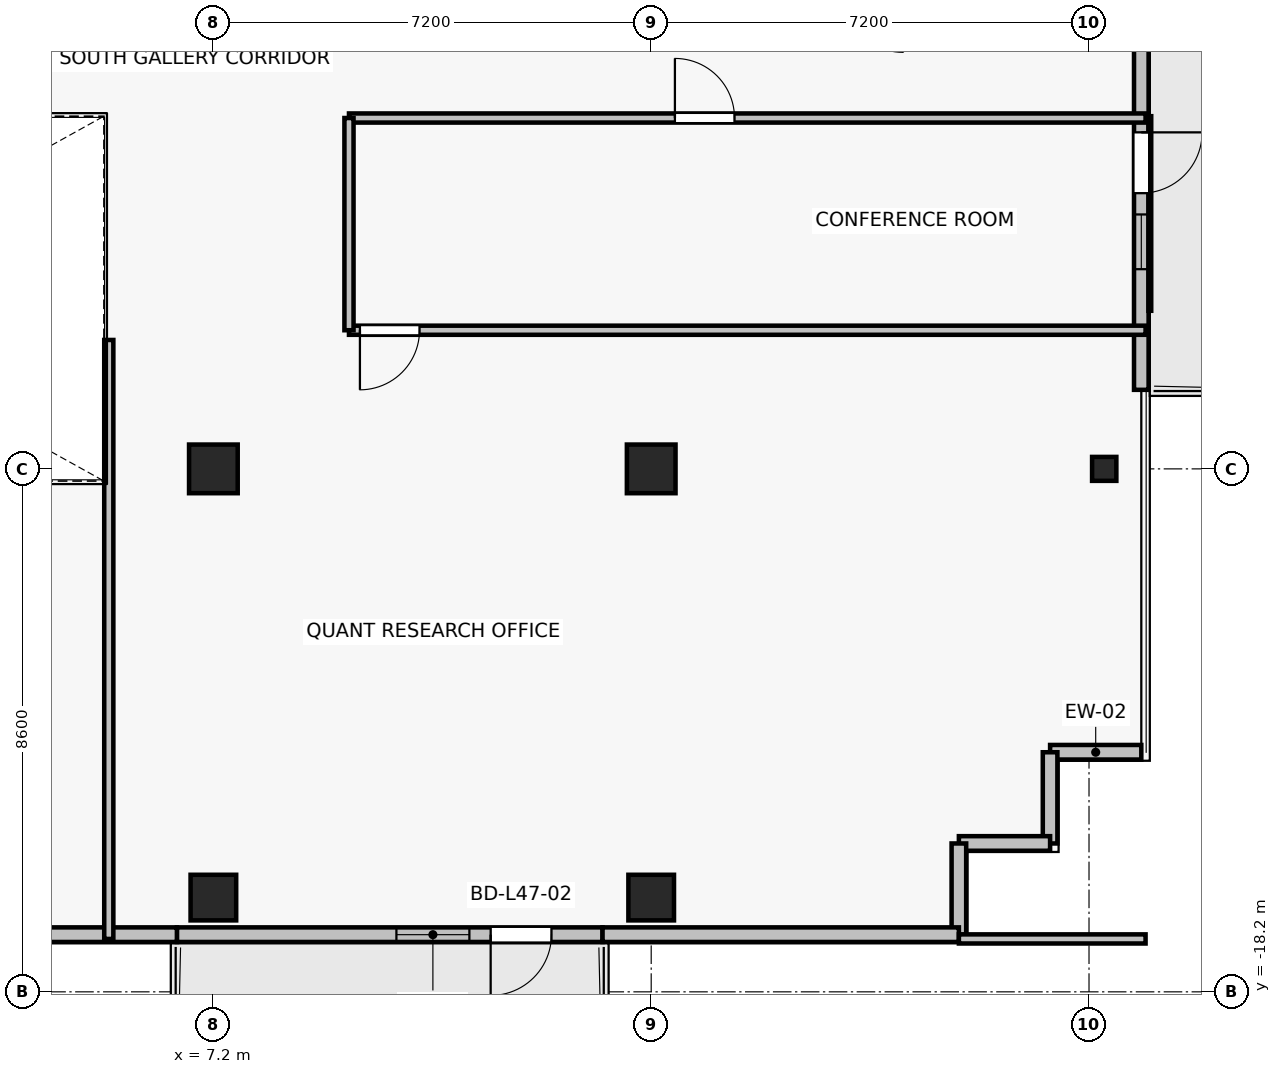
"""IFC4 building model, lengths in metres.
Left out: names, types, materials, properties, quantities, classifications, styles, units other than length and angle.
Written with IfcOpenShell. Run it as: python <this file> out.ifc"""

import sys

from ifc_helpers import new_model, si_unit, direction, frame, frame_2d, origin, origin_2d, place, context, subcontext, project, spatial, rectangle, i_section, extrude, source, transform, mapped, element, fill, save


model = new_model("IFC4")
c1 = context("Model", 3, precision=1e-05, world=origin(), true_north=direction((0.0, 1.0)))
c2 = subcontext(c1, "Body", "Model", "MODEL_VIEW")
j1 = project(units=[si_unit("LENGTHUNIT", "METRE"), si_unit("PLANEANGLEUNIT", "RADIAN")], contexts=[c1])
p1 = place(None, origin())
s1 = spatial("IfcSite", under=j1, at=p1, CompositionType="ELEMENT")
p2 = place(p1, origin())
s2 = spatial("IfcBuilding", under=s1, at=p2, CompositionType="ELEMENT")
p3 = place(p2, frame((0.0, 0.0, 169.3)))
s3 = spatial("IfcBuildingStorey", under=s2, at=p3, CompositionType="ELEMENT", Elevation=169.3)
for number, where, z_axis, x_axis in (
    (1, (7.2, -9.6, 0.0), (0.0, 0.0, 1.0), (1.0, 0.0, 0.0)),
    (2, (14.4, -9.6, 0.0), (0.0, 0.0, 1.0), (1.0, 0.0, 0.0)),
):
    element("IfcColumn", number, at=place(p3, frame(where, z_axis=z_axis, x_axis=x_axis)), inside=s3, PredefinedType="COLUMN", context=c2, shape_type="SweptSolid", body=[
        extrude(rectangle(XDim=0.8, YDim=0.8, at=origin_2d()), origin(), (0.0, 0.0, 1.0), 3.3),
    ])
for number, where, z_axis, x_axis in (
    (3, (7.2, -16.65, 0.0), (0.0, 0.0, 1.0), (1.0, 0.0, 0.0)),
    (4, (14.4, -16.65, 0.0), (0.0, 0.0, 1.0), (1.0, 0.0, 0.0)),
):
    element("IfcColumn", number, at=place(p3, frame(where, z_axis=z_axis, x_axis=x_axis)), inside=s3, PredefinedType="COLUMN", context=c2, shape_type="SweptSolid", body=[
        extrude(rectangle(XDim=0.75, YDim=0.75, at=origin_2d()), origin(), (0.0, 0.0, 1.0), 3.3),
    ])
p4 = place(p3, frame((21.85, -9.6, 0.0), z_axis=(0.0, 0.0, 1.0), x_axis=(1.0, 0.0, 0.0)))
e5 = element("IfcColumn", 5, at=p4, inside=s3, PredefinedType="COLUMN", context=c2, shape_type="SweptSolid", body=[
    extrude(i_section(OverallWidth=0.399, OverallDepth=0.394, WebThickness=0.023, FlangeThickness=0.037, FilletRadius=0.015, at=origin_2d()), origin(), (0.0, 0.0, 1.0), 3.3),
])
p5 = place(p3, frame((13.6, -17.26, 0.0), z_axis=(0.0, 0.0, 1.0), x_axis=(-1.0, 0.0, 0.0)))
e6 = element("IfcWall", 6, at=p5, inside=s3, PredefinedType="SOLIDWALL", context=c2, shape_type="SweptSolid", body=[
    extrude(rectangle(XDim=7.0, YDim=0.24, at=frame_2d((3.5, 0.0))), origin(), (0.0, 0.0, 1.0), 2.59),
])
p6 = place(p5, frame((0.84, 0.0, 0.0)))
e7 = element("IfcOpeningElement", 7, at=p6, cuts=e6, PredefinedType="OPENING", context=c2, shape_type="SweptSolid", body=[
    extrude(rectangle(XDim=1.0, YDim=2.2, at=frame_2d((0.5, 1.1))), frame((0.0, 0.13, 0.0), z_axis=(0.0, -1.0, 0.0), x_axis=(1.0, 0.0, 0.0)), (0.0, 0.0, 1.0), 0.26),
])
p7 = place(p5, frame((2.19, 0.0, 0.85)))
e8 = element("IfcOpeningElement", 8, at=p7, cuts=e6, PredefinedType="OPENING", context=c2, shape_type="SweptSolid", body=[
    extrude(rectangle(XDim=1.2, YDim=1.5, at=frame_2d((0.6, 0.75))), frame((0.0, 0.13, 0.0), z_axis=(0.0, -1.0, 0.0), x_axis=(1.0, 0.0, 0.0)), (0.0, 0.0, 1.0), 0.26),
])
p8 = place(p3, frame((22.46, -2.5, 0.0), z_axis=(0.0, 0.0, 1.0), x_axis=(0.0, -1.0, 0.0)))
e9 = element("IfcWall", 9, at=p8, inside=s3, PredefinedType="SOLIDWALL", context=c2, shape_type="SweptSolid", body=[
    extrude(rectangle(XDim=5.8, YDim=0.24, at=frame_2d((2.9, 0.0))), origin(), (0.0, 0.0, 1.0), 3.075),
])
p9 = place(p8, frame((1.566, 0.0, 0.0)))
e10 = element("IfcOpeningElement", 10, at=p9, cuts=e9, PredefinedType="OPENING", context=c2, shape_type="SweptSolid", body=[
    extrude(rectangle(XDim=1.0, YDim=2.2, at=frame_2d((0.5, 1.1))), frame((0.0, 0.13, 0.0), z_axis=(0.0, -1.0, 0.0), x_axis=(1.0, 0.0, 0.0)), (0.0, 0.0, 1.0), 0.26),
])
p10 = place(p8, frame((2.916, 0.0, 0.85)))
e11 = element("IfcOpeningElement", 11, at=p10, cuts=e9, PredefinedType="OPENING", context=c2, shape_type="SweptSolid", body=[
    extrude(rectangle(XDim=0.9, YDim=1.35, at=frame_2d((0.45, 0.675))), frame((0.0, 0.13, 0.0), z_axis=(0.0, -1.0, 0.0), x_axis=(1.0, 0.0, 0.0)), (0.0, 0.0, 1.0), 0.26),
])
for number, where, z_axis, x_axis in (
    (12, (20.96, -14.26, 0.0), (0.0, 0.0, 1.0), (1.0, 0.0, 0.0)),
    (13, (20.96, -15.76, 0.0), (0.0, 0.0, 1.0), (0.0, 1.0, 0.0)),
    (14, (19.46, -15.76, 0.0), (0.0, 0.0, 1.0), (1.0, 0.0, 0.0)),
    (15, (19.46, -17.26, 0.0), (0.0, 0.0, 1.0), (0.0, 1.0, 0.0)),
):
    element("IfcWall", number, at=place(p3, frame(where, z_axis=z_axis, x_axis=x_axis)), inside=s3, PredefinedType="SOLIDWALL", context=c2, shape_type="SweptSolid", body=[
        extrude(rectangle(XDim=1.5, YDim=0.24, at=frame_2d((0.75, 0.0))), origin(), (0.0, 0.0, 1.0), 3.075),
    ])
p11 = place(p3, frame((13.6, -17.26, 0.0), z_axis=(0.0, 0.0, 1.0), x_axis=(1.0, 0.0, 0.0)))
e16 = element("IfcWall", 16, at=p11, inside=s3, PredefinedType="SOLIDWALL", context=c2, shape_type="SweptSolid", body=[
    extrude(rectangle(XDim=5.86, YDim=0.24, at=frame_2d((2.93, 0.0))), origin(), (0.0, 0.0, 1.0), 2.59),
])
p12 = place(p3, frame((3.2, -17.26, 0.0), z_axis=(0.0, 0.0, 1.0), x_axis=(1.0, 0.0, 0.0)))
e17 = element("IfcWall", 17, at=p12, inside=s3, PredefinedType="SOLIDWALL", context=c2, shape_type="SweptSolid", body=[
    extrude(rectangle(XDim=3.4, YDim=0.24, at=frame_2d((1.7, 0.0))), origin(), (0.0, 0.0, 1.0), 2.59),
])
p13 = place(p3, frame((22.53, -7.32, 0.0), z_axis=(0.0, 0.0, 1.0), x_axis=(-1.0, 0.0, 0.0)))
e18 = element("IfcWall", 18, at=p13, inside=s3, PredefinedType="PARTITIONING", context=c2, shape_type="SweptSolid", body=[
    extrude(rectangle(XDim=13.1, YDim=0.15, at=frame_2d((6.55, 0.0))), origin(), (0.0, 0.0, 1.0), 2.565),
])
p14 = place(p13, frame((11.94, 0.0, 0.0)))
e19 = element("IfcOpeningElement", 19, at=p14, cuts=e18, PredefinedType="OPENING", context=c2, shape_type="SweptSolid", body=[
    extrude(rectangle(XDim=0.98, YDim=2.15, at=frame_2d((0.49, 1.075))), frame((0.0, 0.085, 0.0), z_axis=(0.0, -1.0, 0.0), x_axis=(1.0, 0.0, 0.0)), (0.0, 0.0, 1.0), 0.17),
])
p15 = place(p3, frame((9.43, -3.83, 0.0), z_axis=(0.0, 0.0, 1.0), x_axis=(1.0, 0.0, 0.0)))
e20 = element("IfcWall", 20, at=p15, inside=s3, PredefinedType="PARTITIONING", context=c2, shape_type="SweptSolid", body=[
    extrude(rectangle(XDim=13.1, YDim=0.15, at=frame_2d((6.55, 0.0))), origin(), (0.0, 0.0, 1.0), 2.565),
])
p16 = place(p15, frame((5.36, 0.0, 0.0)))
e21 = element("IfcOpeningElement", 21, at=p16, cuts=e20, PredefinedType="OPENING", context=c2, shape_type="SweptSolid", body=[
    extrude(rectangle(XDim=0.98, YDim=2.15, at=frame_2d((0.49, 1.075))), frame((0.0, 0.085, 0.0), z_axis=(0.0, -1.0, 0.0), x_axis=(1.0, 0.0, 0.0)), (0.0, 0.0, 1.0), 0.17),
])
p17 = place(p3, frame((9.43, -7.32, 0.0), z_axis=(0.0, 0.0, 1.0), x_axis=(0.0, 1.0, 0.0)))
e22 = element("IfcWall", 22, at=p17, inside=s3, PredefinedType="PARTITIONING", context=c2, shape_type="SweptSolid", body=[
    extrude(rectangle(XDim=3.49, YDim=0.15, at=frame_2d((1.745, 0.0))), origin(), (0.0, 0.0, 1.0), 2.665),
])
p18 = place(p3, frame((22.53, -17.33, 0.0), z_axis=(0.0, 0.0, 1.0), x_axis=(-1.0, 0.0, 0.0)))
e23 = element("IfcWall", 23, at=p18, inside=s3, PredefinedType="PARTITIONING", context=c2, shape_type="SweptSolid", body=[
    extrude(rectangle(XDim=3.07, YDim=0.15, at=frame_2d((1.535, 0.0))), origin(), (0.0, 0.0, 1.0), 2.59),
])
p19 = place(p3, frame((5.48, -17.33, 0.0), z_axis=(0.0, 0.0, 1.0), x_axis=(0.0, 1.0, 0.0)))
e24 = element("IfcWall", 24, at=p19, inside=s3, PredefinedType="PARTITIONING", context=c2, shape_type="SweptSolid", body=[
    extrude(rectangle(XDim=9.85, YDim=0.15, at=frame_2d((4.925, 0.0))), origin(), (0.0, 0.0, 1.0), 2.565),
])
m1 = source(origin(), c2, "Body", "SweptSolid", [
    extrude(rectangle(XDim=1.0, YDim=2.2, at=frame_2d((0.5, 1.1))), frame((0.0, 0.025, 0.0), z_axis=(0.0, -1.0, 0.0), x_axis=(1.0, 0.0, 0.0)), (0.0, 0.0, 1.0), 0.05),
])
p20 = place(p6, origin())
e25 = element("IfcDoor", 25, at=p20, inside=s3, OperationType="SINGLE_SWING_RIGHT", PredefinedType="DOOR", context=c2, shape_type="MappedRepresentation", body=[
    mapped(m1, transform((0.0, 0.0, 0.0), x_axis=(1.0, 0.0, 0.0), y_axis=(0.0, 1.0, 0.0), z_axis=(0.0, 0.0, 1.0), scale=1.0)),
])
fill(e7, e25)
m2 = source(origin(), c2, "Body", "SweptSolid", [
    extrude(rectangle(XDim=1.2, YDim=1.5, at=frame_2d((0.6, 0.75))), frame((0.0, 0.03, 0.0), z_axis=(0.0, -1.0, 0.0), x_axis=(1.0, 0.0, 0.0)), (0.0, 0.0, 1.0), 0.06),
])
p21 = place(p7, origin())
e26 = element("IfcWindow", 26, at=p21, inside=s3, PartitioningType="SINGLE_PANEL", PredefinedType="WINDOW", context=c2, shape_type="MappedRepresentation", body=[
    mapped(m2, transform((0.0, 0.0, 0.0), x_axis=(1.0, 0.0, 0.0), y_axis=(0.0, 1.0, 0.0), z_axis=(0.0, 0.0, 1.0), scale=1.0)),
])
fill(e8, e26)
p22 = place(p9, origin())
e27 = element("IfcDoor", 27, at=p22, inside=s3, OperationType="SINGLE_SWING_LEFT", PredefinedType="DOOR", context=c2, shape_type="MappedRepresentation", body=[
    mapped(m1, transform((0.0, 0.0, 0.0), x_axis=(1.0, 0.0, 0.0), y_axis=(0.0, 1.0, 0.0), z_axis=(0.0, 0.0, 1.0), scale=1.0)),
])
fill(e10, e27)
m3 = source(origin(), c2, "Body", "SweptSolid", [
    extrude(rectangle(XDim=0.9, YDim=1.35, at=frame_2d((0.45, 0.675))), frame((0.0, 0.03, 0.0), z_axis=(0.0, -1.0, 0.0), x_axis=(1.0, 0.0, 0.0)), (0.0, 0.0, 1.0), 0.06),
])
p23 = place(p10, origin())
e28 = element("IfcWindow", 28, at=p23, inside=s3, PartitioningType="SINGLE_PANEL", PredefinedType="WINDOW", context=c2, shape_type="MappedRepresentation", body=[
    mapped(m3, transform((0.0, 0.0, 0.0), x_axis=(1.0, 0.0, 0.0), y_axis=(0.0, 1.0, 0.0), z_axis=(0.0, 0.0, 1.0), scale=1.0)),
])
fill(e11, e28)
m4 = source(origin(), c2, "Body", "SweptSolid", [
    extrude(rectangle(XDim=0.98, YDim=2.15, at=frame_2d((0.49, 1.075))), frame((0.0, 0.025, 0.0), z_axis=(0.0, -1.0, 0.0), x_axis=(1.0, 0.0, 0.0)), (0.0, 0.0, 1.0), 0.05),
])
p24 = place(p16, origin())
e29 = element("IfcDoor", 29, at=p24, inside=s3, OperationType="SINGLE_SWING_LEFT", PredefinedType="DOOR", context=c2, shape_type="MappedRepresentation", body=[
    mapped(m4, transform((0.0, 0.0, 0.0), x_axis=(1.0, 0.0, 0.0), y_axis=(0.0, 1.0, 0.0), z_axis=(0.0, 0.0, 1.0), scale=1.0)),
])
fill(e21, e29)
p25 = place(p14, origin())
e30 = element("IfcDoor", 30, at=p25, inside=s3, OperationType="SINGLE_SWING_RIGHT", PredefinedType="DOOR", context=c2, shape_type="MappedRepresentation", body=[
    mapped(m4, transform((0.0, 0.0, 0.0), x_axis=(1.0, 0.0, 0.0), y_axis=(0.0, 1.0, 0.0), z_axis=(0.0, 0.0, 1.0), scale=1.0)),
])
fill(e19, e30)
save(model, sys.argv[1])
